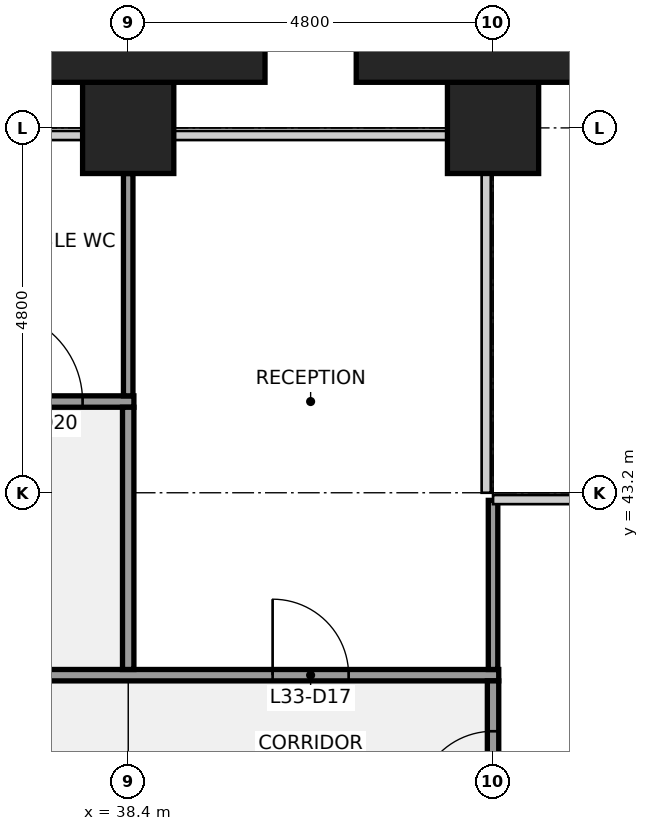
"""IFC4 building model, lengths in metres.
Left out: names, types, materials, properties, quantities, classifications, styles, units other than length and angle.
Written with IfcOpenShell. Run it as: python <this file> out.ifc"""

import sys

from ifc_helpers import new_model, si_unit, direction, frame, frame_2d, origin, origin_2d, place, context, subcontext, project, spatial, rectangle, extrude, element, fill, save


model = new_model("IFC4")
c1 = context("Model", 3, precision=1e-05, world=origin(), true_north=direction((0.0, 1.0)))
c2 = subcontext(c1, "Body", "Model", "MODEL_VIEW")
j1 = project(units=[si_unit("LENGTHUNIT", "METRE"), si_unit("PLANEANGLEUNIT", "RADIAN")], contexts=[c1])
p1 = place(None, origin())
s1 = spatial("IfcSite", under=j1, at=p1, CompositionType="ELEMENT")
p2 = place(p1, origin())
s2 = spatial("IfcBuilding", under=s1, at=p2, CompositionType="ELEMENT")
p3 = place(p2, frame((0.0, 0.0, 152.1)))
s3 = spatial("IfcBuildingStorey", under=s2, at=p3, CompositionType="ELEMENT", Elevation=152.1)
for number, where, z_axis, x_axis in (
    (1, (38.4, 48.0, 0.0), (0.0, 0.0, 1.0), (1.0, 0.0, 0.0)),
    (2, (43.2, 48.0, 0.0), (0.0, 0.0, 1.0), (1.0, 0.0, 0.0)),
):
    element("IfcColumn", number, at=place(p3, frame(where, z_axis=z_axis, x_axis=x_axis)), inside=s3, PredefinedType="COLUMN", context=c2, shape_type="SweptSolid", body=[
        extrude(rectangle(XDim=1.2, YDim=1.2, at=origin_2d()), origin(), (0.0, 0.0, 1.0), 4.0),
    ])
p4 = place(p3, frame((14.325, 40.8, 0.0), z_axis=(0.0, 0.0, 1.0), x_axis=(1.0, 0.0, 0.0)))
e3 = element("IfcWall", 3, at=p4, inside=s3, PredefinedType="PARTITIONING", context=c2, shape_type="SweptSolid", body=[
    extrude(rectangle(XDim=28.95, YDim=0.15, at=frame_2d((14.475, 0.0))), origin(), (0.0, 0.0, 1.0), 2.936),
])
p5 = place(p4, frame((1.975, 0.0, 0.0)))
e4 = element("IfcOpeningElement", 4, at=p5, cuts=e3, PredefinedType="OPENING", context=c2, shape_type="SweptSolid", body=[
    extrude(rectangle(XDim=1.0, YDim=2.1, at=frame_2d((0.5, 1.05))), frame((0.0, 0.085, 0.0), z_axis=(0.0, -1.0, 0.0), x_axis=(1.0, 0.0, 0.0)), (0.0, 0.0, 1.0), 0.17),
])
p6 = place(p4, frame((5.575, 0.0, 0.0)))
e5 = element("IfcOpeningElement", 5, at=p6, cuts=e3, PredefinedType="OPENING", context=c2, shape_type="SweptSolid", body=[
    extrude(rectangle(XDim=1.0, YDim=2.1, at=frame_2d((0.5, 1.05))), frame((0.0, 0.085, 0.0), z_axis=(0.0, -1.0, 0.0), x_axis=(1.0, 0.0, 0.0)), (0.0, 0.0, 1.0), 0.17),
])
p7 = place(p4, frame((9.175, 0.0, 0.0)))
e6 = element("IfcOpeningElement", 6, at=p7, cuts=e3, PredefinedType="OPENING", context=c2, shape_type="SweptSolid", body=[
    extrude(rectangle(XDim=1.0, YDim=2.1, at=frame_2d((0.5, 1.05))), frame((0.0, 0.085, 0.0), z_axis=(0.0, -1.0, 0.0), x_axis=(1.0, 0.0, 0.0)), (0.0, 0.0, 1.0), 0.17),
])
p8 = place(p4, frame((13.975, 0.0, 0.0)))
e7 = element("IfcOpeningElement", 7, at=p8, cuts=e3, PredefinedType="OPENING", context=c2, shape_type="SweptSolid", body=[
    extrude(rectangle(XDim=1.0, YDim=2.1, at=frame_2d((0.5, 1.05))), frame((0.0, 0.085, 0.0), z_axis=(0.0, -1.0, 0.0), x_axis=(1.0, 0.0, 0.0)), (0.0, 0.0, 1.0), 0.17),
])
p9 = place(p4, frame((19.975, 0.0, 0.0)))
e8 = element("IfcOpeningElement", 8, at=p9, cuts=e3, PredefinedType="OPENING", context=c2, shape_type="SweptSolid", body=[
    extrude(rectangle(XDim=1.0, YDim=2.1, at=frame_2d((0.5, 1.05))), frame((0.0, 0.085, 0.0), z_axis=(0.0, -1.0, 0.0), x_axis=(1.0, 0.0, 0.0)), (0.0, 0.0, 1.0), 0.17),
])
p10 = place(p4, frame((25.975, 0.0, 0.0)))
e9 = element("IfcOpeningElement", 9, at=p10, cuts=e3, PredefinedType="OPENING", context=c2, shape_type="SweptSolid", body=[
    extrude(rectangle(XDim=1.0, YDim=2.1, at=frame_2d((0.5, 1.05))), frame((0.0, 0.085, 0.0), z_axis=(0.0, -1.0, 0.0), x_axis=(1.0, 0.0, 0.0)), (0.0, 0.0, 1.0), 0.17),
])
p11 = place(p3, frame((31.125, 44.4, 0.0), z_axis=(0.0, 0.0, 1.0), x_axis=(1.0, 0.0, 0.0)))
e10 = element("IfcWall", 10, at=p11, inside=s3, PredefinedType="PARTITIONING", context=c2, shape_type="SweptSolid", body=[
    extrude(rectangle(XDim=7.35, YDim=0.15, at=frame_2d((3.675, 0.0))), origin(), (0.0, 0.0, 1.0), 2.936),
])
p12 = place(p11, frame((0.825, 0.0, 0.0)))
e11 = element("IfcOpeningElement", 11, at=p12, cuts=e10, PredefinedType="OPENING", context=c2, shape_type="SweptSolid", body=[
    extrude(rectangle(XDim=0.9, YDim=2.1, at=frame_2d((0.45, 1.05))), frame((0.0, 0.085, 0.0), z_axis=(0.0, -1.0, 0.0), x_axis=(1.0, 0.0, 0.0)), (0.0, 0.0, 1.0), 0.17),
])
p13 = place(p11, frame((3.225, 0.0, 0.0)))
e12 = element("IfcOpeningElement", 12, at=p13, cuts=e10, PredefinedType="OPENING", context=c2, shape_type="SweptSolid", body=[
    extrude(rectangle(XDim=0.9, YDim=2.1, at=frame_2d((0.45, 1.05))), frame((0.0, 0.085, 0.0), z_axis=(0.0, -1.0, 0.0), x_axis=(1.0, 0.0, 0.0)), (0.0, 0.0, 1.0), 0.17),
])
p14 = place(p11, frame((5.475, 0.0, 0.0)))
e13 = element("IfcOpeningElement", 13, at=p14, cuts=e10, PredefinedType="OPENING", context=c2, shape_type="SweptSolid", body=[
    extrude(rectangle(XDim=1.2, YDim=2.1, at=frame_2d((0.6, 1.05))), frame((0.0, 0.085, 0.0), z_axis=(0.0, -1.0, 0.0), x_axis=(1.0, 0.0, 0.0)), (0.0, 0.0, 1.0), 0.17),
])
p15 = place(p3, frame((38.4, 44.475, 0.0), z_axis=(0.0, 0.0, 1.0), x_axis=(0.0, 1.0, 0.0)))
e14 = element("IfcWall", 14, at=p15, inside=s3, PredefinedType="PARTITIONING", context=c2, shape_type="SweptSolid", body=[
    extrude(rectangle(XDim=2.925, YDim=0.125, at=frame_2d((1.462, 0.0))), origin(), (0.0, 0.0, 1.0), 2.936),
])
p16 = place(p3, frame((38.4, 40.875, 0.0), z_axis=(0.0, 0.0, 1.0), x_axis=(0.0, 1.0, 0.0)))
e15 = element("IfcWall", 15, at=p16, inside=s3, PredefinedType="PARTITIONING", context=c2, shape_type="SweptSolid", body=[
    extrude(rectangle(XDim=3.45, YDim=0.15, at=frame_2d((1.725, 0.0))), origin(), (0.0, 0.0, 1.0), 2.936),
])
p17 = place(p3, frame((43.2, 40.875, 0.0), z_axis=(0.0, 0.0, 1.0), x_axis=(0.0, 1.0, 0.0)))
e16 = element("IfcWall", 16, at=p17, inside=s3, PredefinedType="PARTITIONING", context=c2, shape_type="SweptSolid", body=[
    extrude(rectangle(XDim=2.225, YDim=0.125, at=frame_2d((1.113, 0.0))), origin(), (0.0, 0.0, 1.0), 2.936),
])
p18 = place(p3, frame((43.2, 38.4, 0.0), z_axis=(0.0, 0.0, 1.0), x_axis=(0.0, 1.0, 0.0)))
e17 = element("IfcWall", 17, at=p18, inside=s3, PredefinedType="PARTITIONING", context=c2, shape_type="SweptSolid", body=[
    extrude(rectangle(XDim=2.325, YDim=0.15, at=frame_2d((1.163, 0.0))), origin(), (0.0, 0.0, 1.0), 2.936),
])
p19 = place(p18, frame((0.663, 0.0, 0.0)))
e18 = element("IfcOpeningElement", 18, at=p19, cuts=e17, PredefinedType="OPENING", context=c2, shape_type="SweptSolid", body=[
    extrude(rectangle(XDim=1.0, YDim=2.1, at=frame_2d((0.5, 1.05))), frame((0.0, 0.085, 0.0), z_axis=(0.0, -1.0, 0.0), x_axis=(1.0, 0.0, 0.0)), (0.0, 0.0, 1.0), 0.17),
])
for number, where, z_axis, x_axis in (
    (19, (38.4, 49.05, 0.0), (0.0, 0.0, 1.0), (1.0, 0.0, 0.0)),
    (20, (43.2, 49.05, 0.0), (0.0, 0.0, 1.0), (1.0, 0.0, 0.0)),
):
    element("IfcColumn", number, at=place(p3, frame(where, z_axis=z_axis, x_axis=x_axis)), inside=s3, PredefinedType="PILASTER", context=c2, shape_type="SweptSolid", body=[
        extrude(rectangle(XDim=3.6, YDim=0.9, at=origin_2d()), origin(), (0.0, 0.0, 1.0), 4.0),
    ])
p20 = place(p10, origin())
e21 = element("IfcDoor", 21, at=p20, inside=s3, OperationType="SINGLE_SWING_LEFT", PredefinedType="DOOR", context=c2, shape_type="SweptSolid", body=[
    extrude(rectangle(XDim=1.0, YDim=2.1, at=frame_2d((0.5, 1.05))), frame((0.0, 0.025, 0.0), z_axis=(0.0, -1.0, 0.0), x_axis=(1.0, 0.0, 0.0)), (0.0, 0.0, 1.0), 0.05),
])
fill(e9, e21)
p21 = place(p14, origin())
e22 = element("IfcDoor", 22, at=p21, inside=s3, OperationType="SINGLE_SWING_LEFT", PredefinedType="DOOR", context=c2, shape_type="SweptSolid", body=[
    extrude(rectangle(XDim=1.2, YDim=2.1, at=frame_2d((0.6, 1.05))), frame((0.0, 0.025, 0.0), z_axis=(0.0, -1.0, 0.0), x_axis=(1.0, 0.0, 0.0)), (0.0, 0.0, 1.0), 0.05),
])
fill(e13, e22)
p22 = place(p19, origin())
e23 = element("IfcDoor", 23, at=p22, inside=s3, OperationType="SINGLE_SWING_LEFT", PredefinedType="DOOR", context=c2, shape_type="SweptSolid", body=[
    extrude(rectangle(XDim=1.0, YDim=2.1, at=frame_2d((0.5, 1.05))), frame((0.0, 0.025, 0.0), z_axis=(0.0, -1.0, 0.0), x_axis=(1.0, 0.0, 0.0)), (0.0, 0.0, 1.0), 0.05),
])
fill(e18, e23)
save(model, sys.argv[1])
